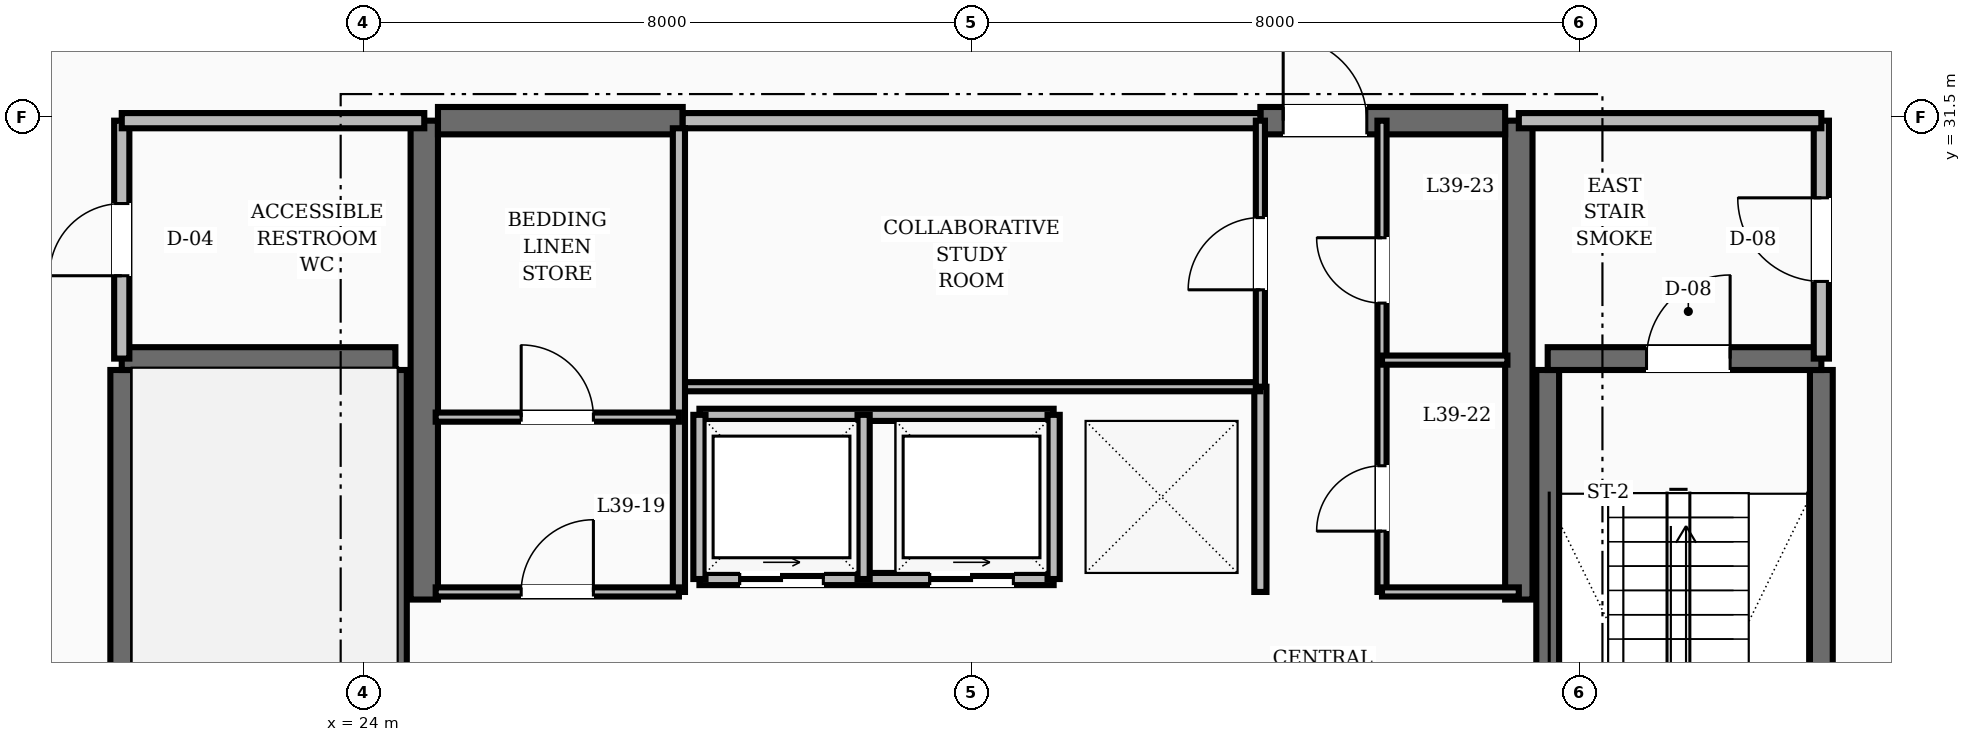
"""IFC4 building model, lengths in metres.
Left out: names, types, materials, properties, quantities, classifications, styles, units other than length and angle.
Written with IfcOpenShell. Run it as: python <this file> out.ifc"""

import sys

from ifc_helpers import new_model, si_unit, direction, frame, frame_2d, origin, place, context, subcontext, project, spatial, rectangle, extrude, element, fill, save


model = new_model("IFC4")
c1 = context("Model", 3, precision=1e-05, world=origin(), true_north=direction((0.0, 1.0)))
c2 = subcontext(c1, "Body", "Model", "MODEL_VIEW")
j1 = project(units=[si_unit("LENGTHUNIT", "METRE"), si_unit("PLANEANGLEUNIT", "RADIAN")], contexts=[c1])
p1 = place(None, origin())
s1 = spatial("IfcSite", under=j1, at=p1, CompositionType="ELEMENT")
p2 = place(p1, origin())
s2 = spatial("IfcBuilding", under=s1, at=p2, CompositionType="ELEMENT")
p3 = place(p2, frame((0.0, 0.0, 153.2)))
s3 = spatial("IfcBuildingStorey", under=s2, at=p3, CompositionType="ELEMENT", Elevation=153.2)
for number, where, z_axis, x_axis in (
    (1, (24.8, 25.15, 0.0), (0.0, 0.0, 1.0), (0.0, 1.0, 0.0)),
    (2, (39.2, 25.15, 0.0), (0.0, 0.0, 1.0), (0.0, 1.0, 0.0)),
):
    element("IfcWall", number, at=place(p3, frame(where, z_axis=z_axis, x_axis=x_axis)), inside=s3, PredefinedType="SHEAR", context=c2, shape_type="SweptSolid", body=[
        extrude(rectangle(XDim=6.3, YDim=0.36, at=frame_2d((3.15, 0.0))), origin(), (0.0, 0.0, 1.0), 3.6),
    ])
p4 = place(p3, frame((24.98, 31.45, 0.0), z_axis=(0.0, 0.0, 1.0), x_axis=(1.0, 0.0, 0.0)))
e3 = element("IfcWall", 3, at=p4, inside=s3, PredefinedType="SHEAR", context=c2, shape_type="SweptSolid", body=[
    extrude(rectangle(XDim=3.22, YDim=0.36, at=frame_2d((1.61, 0.0))), origin(), (0.0, 0.0, 1.0), 3.6),
])
p5 = place(p3, frame((35.8, 31.45, 0.0), z_axis=(0.0, 0.0, 1.0), x_axis=(1.0, 0.0, 0.0)))
e4 = element("IfcWall", 4, at=p5, inside=s3, PredefinedType="SHEAR", context=c2, shape_type="SweptSolid", body=[
    extrude(rectangle(XDim=3.22, YDim=0.36, at=frame_2d((1.61, 0.0))), origin(), (0.0, 0.0, 1.0), 3.6),
])
p6 = place(p5, frame((0.3, 0.0, 0.0)))
e5 = element("IfcOpeningElement", 5, at=p6, cuts=e4, PredefinedType="OPENING", context=c2, shape_type="SweptSolid", body=[
    extrude(rectangle(XDim=1.1, YDim=2.1, at=frame_2d((0.55, 1.05))), frame((0.0, 0.19, 0.0), z_axis=(0.0, -1.0, 0.0), x_axis=(1.0, 0.0, 0.0)), (0.0, 0.0, 1.0), 0.38),
])
for number, where, z_axis, x_axis in (
    (6, (20.82, 19.43, 0.0), (0.0, 0.0, 1.0), (0.0, 1.0, 0.0)),
    (7, (24.42, 19.43, 0.0), (0.0, 0.0, 1.0), (0.0, 1.0, 0.0)),
):
    element("IfcWall", number, at=place(p3, frame(where, z_axis=z_axis, x_axis=x_axis)), inside=s3, PredefinedType="SHEAR", context=c2, shape_type="SweptSolid", body=[
        extrude(rectangle(XDim=8.74, YDim=0.3, at=frame_2d((4.37, 0.0))), origin(), (0.0, 0.0, 1.0), 3.6),
    ])
p7 = place(p3, frame((20.82, 28.32, 0.0), z_axis=(0.0, 0.0, 1.0), x_axis=(1.0, 0.0, 0.0)))
e8 = element("IfcWall", 8, at=p7, inside=s3, PredefinedType="SHEAR", context=c2, shape_type="SweptSolid", body=[
    extrude(rectangle(XDim=3.6, YDim=0.3, at=frame_2d((1.8, 0.0))), origin(), (0.0, 0.0, 1.0), 3.6),
])
for number, where, z_axis, x_axis in (
    (9, (43.18, 19.43, 0.0), (0.0, 0.0, 1.0), (0.0, 1.0, 0.0)),
    (10, (39.58, 19.43, 0.0), (0.0, 0.0, 1.0), (0.0, 1.0, 0.0)),
):
    element("IfcWall", number, at=place(p3, frame(where, z_axis=z_axis, x_axis=x_axis)), inside=s3, PredefinedType="SHEAR", context=c2, shape_type="SweptSolid", body=[
        extrude(rectangle(XDim=8.74, YDim=0.3, at=frame_2d((4.37, 0.0))), origin(), (0.0, 0.0, 1.0), 3.6),
    ])
p8 = place(p3, frame((39.58, 28.32, 0.0), z_axis=(0.0, 0.0, 1.0), x_axis=(1.0, 0.0, 0.0)))
e11 = element("IfcWall", 11, at=p8, inside=s3, PredefinedType="SHEAR", context=c2, shape_type="SweptSolid", body=[
    extrude(rectangle(XDim=3.6, YDim=0.3, at=frame_2d((1.8, 0.0))), origin(), (0.0, 0.0, 1.0), 3.6),
])
p9 = place(p8, frame((1.3, 0.0, 0.0)))
e12 = element("IfcOpeningElement", 12, at=p9, cuts=e11, PredefinedType="OPENING", context=c2, shape_type="SweptSolid", body=[
    extrude(rectangle(XDim=1.1, YDim=2.1, at=frame_2d((0.55, 1.05))), frame((0.0, 0.16, 0.0), z_axis=(0.0, -1.0, 0.0), x_axis=(1.0, 0.0, 0.0)), (0.0, 0.0, 1.0), 0.32),
])
p10 = place(p3, frame((43.18, 28.32, 0.0), z_axis=(0.0, 0.0, 1.0), x_axis=(0.0, 1.0, 0.0)))
e13 = element("IfcWall", 13, at=p10, inside=s3, PredefinedType="SOLIDWALL", context=c2, shape_type="SweptSolid", body=[
    extrude(rectangle(XDim=3.13, YDim=0.2, at=frame_2d((1.565, 0.0))), origin(), (0.0, 0.0, 1.0), 2.8),
])
p11 = place(p10, frame((1.015, 0.0, 0.0)))
e14 = element("IfcOpeningElement", 14, at=p11, cuts=e13, PredefinedType="OPENING", context=c2, shape_type="SweptSolid", body=[
    extrude(rectangle(XDim=1.1, YDim=2.1, at=frame_2d((0.55, 1.05))), frame((0.0, 0.11, 0.0), z_axis=(0.0, -1.0, 0.0), x_axis=(1.0, 0.0, 0.0)), (0.0, 0.0, 1.0), 0.22),
])
p12 = place(p3, frame((39.2, 31.45, 0.0), z_axis=(0.0, 0.0, 1.0), x_axis=(1.0, 0.0, 0.0)))
e15 = element("IfcWall", 15, at=p12, inside=s3, PredefinedType="SOLIDWALL", context=c2, shape_type="SweptSolid", body=[
    extrude(rectangle(XDim=3.98, YDim=0.2, at=frame_2d((1.99, 0.0))), origin(), (0.0, 0.0, 1.0), 2.8),
])
p13 = place(p3, frame((20.82, 28.32, 0.0), z_axis=(0.0, 0.0, 1.0), x_axis=(0.0, 1.0, 0.0)))
e16 = element("IfcWall", 16, at=p13, inside=s3, PredefinedType="SOLIDWALL", context=c2, shape_type="SweptSolid", body=[
    extrude(rectangle(XDim=3.13, YDim=0.2, at=frame_2d((1.565, 0.0))), origin(), (0.0, 0.0, 1.0), 2.8),
])
p14 = place(p13, frame((1.09, 0.0, 0.0)))
e17 = element("IfcOpeningElement", 17, at=p14, cuts=e16, PredefinedType="OPENING", context=c2, shape_type="SweptSolid", body=[
    extrude(rectangle(XDim=0.95, YDim=2.1, at=frame_2d((0.475, 1.05))), frame((0.0, 0.11, 0.0), z_axis=(0.0, -1.0, 0.0), x_axis=(1.0, 0.0, 0.0)), (0.0, 0.0, 1.0), 0.22),
])
p15 = place(p3, frame((20.82, 31.45, 0.0), z_axis=(0.0, 0.0, 1.0), x_axis=(1.0, 0.0, 0.0)))
e18 = element("IfcWall", 18, at=p15, inside=s3, PredefinedType="SOLIDWALL", context=c2, shape_type="SweptSolid", body=[
    extrude(rectangle(XDim=3.98, YDim=0.2, at=frame_2d((1.99, 0.0))), origin(), (0.0, 0.0, 1.0), 2.8),
])
p16 = place(p3, frame((35.8, 25.25, 0.0), z_axis=(0.0, 0.0, 1.0), x_axis=(0.0, 1.0, 0.0)))
e19 = element("IfcWall", 19, at=p16, inside=s3, PredefinedType="SOLIDWALL", context=c2, shape_type="SweptSolid", body=[
    extrude(rectangle(XDim=2.7, YDim=0.16, at=frame_2d((1.35, 0.0))), origin(), (0.0, 0.0, 1.0), 2.8),
])
p17 = place(p3, frame((28.42, 25.42, 0.0), z_axis=(0.0, 0.0, 1.0), x_axis=(1.0, 0.0, 0.0)))
e20 = element("IfcWall", 20, at=p17, inside=s3, PredefinedType="SOLIDWALL", context=c2, shape_type="SweptSolid", body=[
    extrude(rectangle(XDim=4.66, YDim=0.16, at=frame_2d((2.33, 0.0))), origin(), (0.0, 0.0, 1.0), 2.8),
])
p18 = place(p17, frame((0.53, 0.0, 0.0)))
e21 = element("IfcOpeningElement", 21, at=p18, cuts=e20, PredefinedType="OPENING", context=c2, shape_type="SweptSolid", body=[
    extrude(rectangle(XDim=1.1, YDim=2.15, at=frame_2d((0.55, 1.075))), frame((0.0, 0.09, 0.0), z_axis=(0.0, -1.0, 0.0), x_axis=(1.0, 0.0, 0.0)), (0.0, 0.0, 1.0), 0.18),
])
p19 = place(p17, frame((3.03, 0.0, 0.0)))
e22 = element("IfcOpeningElement", 22, at=p19, cuts=e20, PredefinedType="OPENING", context=c2, shape_type="SweptSolid", body=[
    extrude(rectangle(XDim=1.1, YDim=2.15, at=frame_2d((0.55, 1.075))), frame((0.0, 0.09, 0.0), z_axis=(0.0, -1.0, 0.0), x_axis=(1.0, 0.0, 0.0)), (0.0, 0.0, 1.0), 0.18),
])
p20 = place(p3, frame((28.42, 27.58, 0.0), z_axis=(0.0, 0.0, 1.0), x_axis=(1.0, 0.0, 0.0)))
e23 = element("IfcWall", 23, at=p20, inside=s3, PredefinedType="SOLIDWALL", context=c2, shape_type="SweptSolid", body=[
    extrude(rectangle(XDim=4.66, YDim=0.16, at=frame_2d((2.33, 0.0))), origin(), (0.0, 0.0, 1.0), 2.8),
])
for number, where, z_axis, x_axis in (
    (24, (28.42, 25.42, 0.0), (0.0, 0.0, 1.0), (0.0, 1.0, 0.0)),
    (25, (30.58, 25.42, 0.0), (0.0, 0.0, 1.0), (0.0, 1.0, 0.0)),
    (26, (33.08, 25.42, 0.0), (0.0, 0.0, 1.0), (0.0, 1.0, 0.0)),
):
    element("IfcWall", number, at=place(p3, frame(where, z_axis=z_axis, x_axis=x_axis)), inside=s3, PredefinedType="SOLIDWALL", context=c2, shape_type="SweptSolid", body=[
        extrude(rectangle(XDim=2.16, YDim=0.16, at=frame_2d((1.08, 0.0))), origin(), (0.0, 0.0, 1.0), 2.8),
    ])
p21 = place(p3, frame((28.2, 31.45, 0.0), z_axis=(0.0, 0.0, 1.0), x_axis=(1.0, 0.0, 0.0)))
e27 = element("IfcWall", 27, at=p21, inside=s3, PredefinedType="SOLIDWALL", context=c2, shape_type="SweptSolid", body=[
    extrude(rectangle(XDim=7.6, YDim=0.2, at=frame_2d((3.8, 0.0))), origin(), (0.0, 0.0, 1.0), 2.8),
])
p22 = place(p3, frame((28.2, 27.95, 0.0), z_axis=(0.0, 0.0, 1.0), x_axis=(1.0, 0.0, 0.0)))
e28 = element("IfcWall", 28, at=p22, inside=s3, PredefinedType="PARTITIONING", context=c2, shape_type="SweptSolid", body=[
    extrude(rectangle(XDim=7.6, YDim=0.12, at=frame_2d((3.8, 0.0))), origin(), (0.0, 0.0, 1.0), 2.8),
])
p23 = place(p3, frame((35.8, 27.95, 0.0), z_axis=(0.0, 0.0, 1.0), x_axis=(0.0, 1.0, 0.0)))
e29 = element("IfcWall", 29, at=p23, inside=s3, PredefinedType="PARTITIONING", context=c2, shape_type="SweptSolid", body=[
    extrude(rectangle(XDim=3.5, YDim=0.12, at=frame_2d((1.75, 0.0))), origin(), (0.0, 0.0, 1.0), 2.8),
])
p24 = place(p23, frame((1.275, 0.0, 0.0)))
e30 = element("IfcOpeningElement", 30, at=p24, cuts=e29, PredefinedType="OPENING", context=c2, shape_type="SweptSolid", body=[
    extrude(rectangle(XDim=0.95, YDim=2.1, at=frame_2d((0.475, 1.05))), frame((0.0, 0.07, 0.0), z_axis=(0.0, -1.0, 0.0), x_axis=(1.0, 0.0, 0.0)), (0.0, 0.0, 1.0), 0.14),
])
p25 = place(p3, frame((28.15, 25.25, 0.0), z_axis=(0.0, 0.0, 1.0), x_axis=(0.0, 1.0, 0.0)))
e31 = element("IfcWall", 31, at=p25, inside=s3, PredefinedType="SOLIDWALL", context=c2, shape_type="SweptSolid", body=[
    extrude(rectangle(XDim=6.1, YDim=0.16, at=frame_2d((3.05, 0.0))), origin(), (0.0, 0.0, 1.0), 2.8),
])
p26 = place(p3, frame((24.95, 25.25, 0.0), z_axis=(0.0, 0.0, 1.0), x_axis=(1.0, 0.0, 0.0)))
e32 = element("IfcWall", 32, at=p26, inside=s3, PredefinedType="PARTITIONING", context=c2, shape_type="SweptSolid", body=[
    extrude(rectangle(XDim=3.2, YDim=0.12, at=frame_2d((1.6, 0.0))), origin(), (0.0, 0.0, 1.0), 2.8),
])
p27 = place(p26, frame((1.125, 0.0, 0.0)))
e33 = element("IfcOpeningElement", 33, at=p27, cuts=e32, PredefinedType="OPENING", context=c2, shape_type="SweptSolid", body=[
    extrude(rectangle(XDim=0.95, YDim=2.1, at=frame_2d((0.475, 1.05))), frame((0.0, 0.07, 0.0), z_axis=(0.0, -1.0, 0.0), x_axis=(1.0, 0.0, 0.0)), (0.0, 0.0, 1.0), 0.14),
])
p28 = place(p3, frame((37.4, 25.25, 0.0), z_axis=(0.0, 0.0, 1.0), x_axis=(0.0, 1.0, 0.0)))
e34 = element("IfcWall", 34, at=p28, inside=s3, PredefinedType="PARTITIONING", context=c2, shape_type="SweptSolid", body=[
    extrude(rectangle(XDim=6.2, YDim=0.12, at=frame_2d((3.1, 0.0))), origin(), (0.0, 0.0, 1.0), 2.8),
])
p29 = place(p28, frame((0.8, 0.0, 0.0)))
e35 = element("IfcOpeningElement", 35, at=p29, cuts=e34, PredefinedType="OPENING", context=c2, shape_type="SweptSolid", body=[
    extrude(rectangle(XDim=0.86, YDim=2.1, at=frame_2d((0.43, 1.05))), frame((0.0, 0.07, 0.0), z_axis=(0.0, -1.0, 0.0), x_axis=(1.0, 0.0, 0.0)), (0.0, 0.0, 1.0), 0.14),
])
p30 = place(p28, frame((3.8, 0.0, 0.0)))
e36 = element("IfcOpeningElement", 36, at=p30, cuts=e34, PredefinedType="OPENING", context=c2, shape_type="SweptSolid", body=[
    extrude(rectangle(XDim=0.86, YDim=2.1, at=frame_2d((0.43, 1.05))), frame((0.0, 0.07, 0.0), z_axis=(0.0, -1.0, 0.0), x_axis=(1.0, 0.0, 0.0)), (0.0, 0.0, 1.0), 0.14),
])
p31 = place(p3, frame((37.4, 25.25, 0.0), z_axis=(0.0, 0.0, 1.0), x_axis=(1.0, 0.0, 0.0)))
e37 = element("IfcWall", 37, at=p31, inside=s3, PredefinedType="PARTITIONING", context=c2, shape_type="SweptSolid", body=[
    extrude(rectangle(XDim=1.8, YDim=0.12, at=frame_2d((0.9, 0.0))), origin(), (0.0, 0.0, 1.0), 2.8),
])
p32 = place(p3, frame((24.95, 27.55, 0.0), z_axis=(0.0, 0.0, 1.0), x_axis=(1.0, 0.0, 0.0)))
e38 = element("IfcWall", 38, at=p32, inside=s3, PredefinedType="PARTITIONING", context=c2, shape_type="SweptSolid", body=[
    extrude(rectangle(XDim=3.2, YDim=0.12, at=frame_2d((1.6, 0.0))), origin(), (0.0, 0.0, 1.0), 2.8),
])
p33 = place(p32, frame((1.125, 0.0, 0.0)))
e39 = element("IfcOpeningElement", 39, at=p33, cuts=e38, PredefinedType="OPENING", context=c2, shape_type="SweptSolid", body=[
    extrude(rectangle(XDim=0.95, YDim=2.1, at=frame_2d((0.475, 1.05))), frame((0.0, 0.07, 0.0), z_axis=(0.0, -1.0, 0.0), x_axis=(1.0, 0.0, 0.0)), (0.0, 0.0, 1.0), 0.14),
])
p34 = place(p3, frame((37.4, 28.3, 0.0), z_axis=(0.0, 0.0, 1.0), x_axis=(1.0, 0.0, 0.0)))
e40 = element("IfcWall", 40, at=p34, inside=s3, PredefinedType="PARTITIONING", context=c2, shape_type="SweptSolid", body=[
    extrude(rectangle(XDim=1.65, YDim=0.12, at=frame_2d((0.825, 0.0))), origin(), (0.0, 0.0, 1.0), 2.8),
])
p35 = place(p9, origin())
e41 = element("IfcDoor", 41, at=p35, inside=s3, OperationType="SINGLE_SWING_RIGHT", PredefinedType="DOOR", context=c2, shape_type="SweptSolid", body=[
    extrude(rectangle(XDim=1.1, YDim=2.1, at=frame_2d((0.55, 1.05))), frame((0.0, 0.025, 0.0), z_axis=(0.0, -1.0, 0.0), x_axis=(1.0, 0.0, 0.0)), (0.0, 0.0, 1.0), 0.05),
])
fill(e12, e41)
p36 = place(p11, origin())
e42 = element("IfcDoor", 42, at=p36, inside=s3, OperationType="SINGLE_SWING_RIGHT", PredefinedType="DOOR", context=c2, shape_type="SweptSolid", body=[
    extrude(rectangle(XDim=1.1, YDim=2.1, at=frame_2d((0.55, 1.05))), frame((0.0, 0.025, 0.0), z_axis=(0.0, -1.0, 0.0), x_axis=(1.0, 0.0, 0.0)), (0.0, 0.0, 1.0), 0.05),
])
fill(e14, e42)
p37 = place(p14, origin())
e43 = element("IfcDoor", 43, at=p37, inside=s3, OperationType="SINGLE_SWING_LEFT", PredefinedType="DOOR", context=c2, shape_type="SweptSolid", body=[
    extrude(rectangle(XDim=0.95, YDim=2.1, at=frame_2d((0.475, 1.05))), frame((0.0, 0.025, 0.0), z_axis=(0.0, -1.0, 0.0), x_axis=(1.0, 0.0, 0.0)), (0.0, 0.0, 1.0), 0.05),
])
fill(e17, e43)
p38 = place(p6, origin())
e44 = element("IfcDoor", 44, at=p38, inside=s3, OperationType="SINGLE_SWING_LEFT", PredefinedType="DOOR", context=c2, shape_type="SweptSolid", body=[
    extrude(rectangle(XDim=1.1, YDim=2.1, at=frame_2d((0.55, 1.05))), frame((0.0, 0.025, 0.0), z_axis=(0.0, -1.0, 0.0), x_axis=(1.0, 0.0, 0.0)), (0.0, 0.0, 1.0), 0.05),
])
fill(e5, e44)
p39 = place(p18, origin())
e45 = element("IfcDoor", 45, at=p39, inside=s3, OperationType="SLIDING_TO_RIGHT", PredefinedType="DOOR", context=c2, shape_type="SweptSolid", body=[
    extrude(rectangle(XDim=1.1, YDim=2.15, at=frame_2d((0.55, 1.075))), frame((0.0, 0.025, 0.0), z_axis=(0.0, -1.0, 0.0), x_axis=(1.0, 0.0, 0.0)), (0.0, 0.0, 1.0), 0.05),
])
fill(e21, e45)
p40 = place(p19, origin())
e46 = element("IfcDoor", 46, at=p40, inside=s3, OperationType="SLIDING_TO_RIGHT", PredefinedType="DOOR", context=c2, shape_type="SweptSolid", body=[
    extrude(rectangle(XDim=1.1, YDim=2.15, at=frame_2d((0.55, 1.075))), frame((0.0, 0.025, 0.0), z_axis=(0.0, -1.0, 0.0), x_axis=(1.0, 0.0, 0.0)), (0.0, 0.0, 1.0), 0.05),
])
fill(e22, e46)
p41 = place(p24, origin())
e47 = element("IfcDoor", 47, at=p41, inside=s3, OperationType="SINGLE_SWING_LEFT", PredefinedType="DOOR", context=c2, shape_type="SweptSolid", body=[
    extrude(rectangle(XDim=0.95, YDim=2.1, at=frame_2d((0.475, 1.05))), frame((0.0, 0.025, 0.0), z_axis=(0.0, -1.0, 0.0), x_axis=(1.0, 0.0, 0.0)), (0.0, 0.0, 1.0), 0.05),
])
fill(e30, e47)
p42 = place(p27, origin())
e48 = element("IfcDoor", 48, at=p42, inside=s3, OperationType="SINGLE_SWING_RIGHT", PredefinedType="DOOR", context=c2, shape_type="SweptSolid", body=[
    extrude(rectangle(XDim=0.95, YDim=2.1, at=frame_2d((0.475, 1.05))), frame((0.0, 0.025, 0.0), z_axis=(0.0, -1.0, 0.0), x_axis=(1.0, 0.0, 0.0)), (0.0, 0.0, 1.0), 0.05),
])
fill(e33, e48)
p43 = place(p33, origin())
e49 = element("IfcDoor", 49, at=p43, inside=s3, OperationType="SINGLE_SWING_LEFT", PredefinedType="DOOR", context=c2, shape_type="SweptSolid", body=[
    extrude(rectangle(XDim=0.95, YDim=2.1, at=frame_2d((0.475, 1.05))), frame((0.0, 0.025, 0.0), z_axis=(0.0, -1.0, 0.0), x_axis=(1.0, 0.0, 0.0)), (0.0, 0.0, 1.0), 0.05),
])
fill(e39, e49)
p44 = place(p29, origin())
e50 = element("IfcDoor", 50, at=p44, inside=s3, OperationType="SINGLE_SWING_LEFT", PredefinedType="DOOR", context=c2, shape_type="SweptSolid", body=[
    extrude(rectangle(XDim=0.86, YDim=2.1, at=frame_2d((0.43, 1.05))), frame((0.0, 0.025, 0.0), z_axis=(0.0, -1.0, 0.0), x_axis=(1.0, 0.0, 0.0)), (0.0, 0.0, 1.0), 0.05),
])
fill(e35, e50)
p45 = place(p30, origin())
e51 = element("IfcDoor", 51, at=p45, inside=s3, OperationType="SINGLE_SWING_RIGHT", PredefinedType="DOOR", context=c2, shape_type="SweptSolid", body=[
    extrude(rectangle(XDim=0.86, YDim=2.1, at=frame_2d((0.43, 1.05))), frame((0.0, 0.025, 0.0), z_axis=(0.0, -1.0, 0.0), x_axis=(1.0, 0.0, 0.0)), (0.0, 0.0, 1.0), 0.05),
])
fill(e36, e51)
save(model, sys.argv[1])
